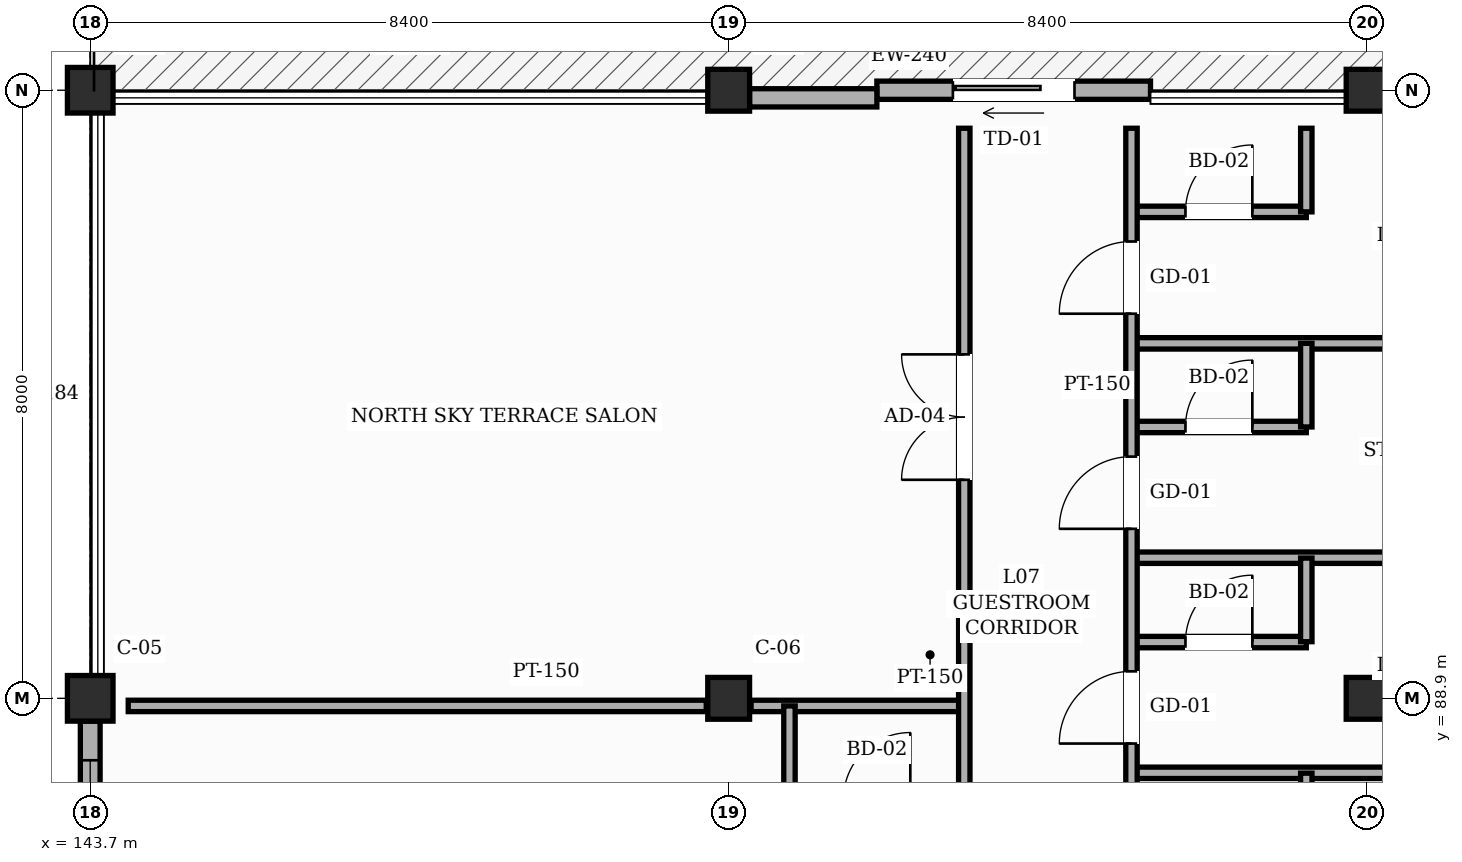
"""IFC4 building model, lengths in metres.
Left out: names, types, materials, properties, quantities, classifications, styles, units other than length and angle.
Written with IfcOpenShell. Run it as: python <this file> out.ifc"""

import sys

from ifc_helpers import new_model, si_unit, direction, frame, frame_2d, origin, origin_2d, place, context, subcontext, project, spatial, rectangle, hollow_rectangle, extrude, element, fill, save


model = new_model("IFC4")
c1 = context("Model", 3, precision=1e-05, world=origin(), true_north=direction((0.0, 1.0)))
c2 = subcontext(c1, "Body", "Model", "MODEL_VIEW")
j1 = project(units=[si_unit("LENGTHUNIT", "METRE"), si_unit("PLANEANGLEUNIT", "RADIAN")], contexts=[c1])
p1 = place(None, origin())
s1 = spatial("IfcSite", under=j1, at=p1, CompositionType="ELEMENT")
p2 = place(p1, origin())
s2 = spatial("IfcBuilding", under=s1, at=p2, CompositionType="ELEMENT")
p3 = place(p2, frame((0.0, 0.0, 31.8)))
s3 = spatial("IfcBuildingStorey", under=s2, at=p3, CompositionType="ELEMENT", Elevation=31.8)
for number, where, z_axis, x_axis in (
    (1, (143.7, 88.9, 0.0), (0.0, 0.0, 1.0), (1.0, 0.0, 0.0)),
    (2, (143.7, 96.9, 0.0), (0.0, 0.0, 1.0), (1.0, 0.0, 0.0)),
):
    element("IfcColumn", number, at=place(p3, frame(where, z_axis=z_axis, x_axis=x_axis)), inside=s3, PredefinedType="COLUMN", context=c2, shape_type="SweptSolid", body=[
        extrude(hollow_rectangle(XDim=0.6, YDim=0.6, WallThickness=0.025, InnerFilletRadius=0.025, OuterFilletRadius=0.05, at=origin_2d()), origin(), (0.0, 0.0, 1.0), 3.6),
    ])
for number, where, z_axis, x_axis in (
    (3, (152.1, 88.9, 0.0), (0.0, 0.0, 1.0), (1.0, 0.0, 0.0)),
    (4, (152.1, 96.9, 0.0), (0.0, 0.0, 1.0), (1.0, 0.0, 0.0)),
    (5, (160.5, 88.9, 0.0), (0.0, 0.0, 1.0), (1.0, 0.0, 0.0)),
    (6, (160.5, 96.9, 0.0), (0.0, 0.0, 1.0), (1.0, 0.0, 0.0)),
):
    element("IfcColumn", number, at=place(p3, frame(where, z_axis=z_axis, x_axis=x_axis)), inside=s3, PredefinedType="COLUMN", context=c2, shape_type="SweptSolid", body=[
        extrude(hollow_rectangle(XDim=0.55, YDim=0.55, WallThickness=0.022, InnerFilletRadius=0.022, OuterFilletRadius=0.044, at=origin_2d()), origin(), (0.0, 0.0, 1.0), 3.6),
    ])
p4 = place(p3, frame((143.7, 81.2, 0.0), z_axis=(0.0, 0.0, 1.0), x_axis=(0.0, 1.0, 0.0)))
e7 = element("IfcWall", 7, at=p4, inside=s3, PredefinedType="SOLIDWALL", context=c2, shape_type="SweptSolid", body=[
    extrude(rectangle(XDim=7.4, YDim=0.26, at=frame_2d((3.7, 0.0))), origin(), (0.0, 0.0, 1.0), 2.805),
])
p5 = place(p4, frame((0.15, 0.0, 0.85)))
e8 = element("IfcOpeningElement", 8, at=p5, cuts=e7, PredefinedType="OPENING", context=c2, shape_type="SweptSolid", body=[
    extrude(rectangle(XDim=1.35, YDim=1.35, at=frame_2d((0.675, 0.675))), frame((0.0, 0.14, 0.0), z_axis=(0.0, -1.0, 0.0), x_axis=(1.0, 0.0, 0.0)), (0.0, 0.0, 1.0), 0.28),
])
p6 = place(p4, frame((2.355, 0.0, 0.85)))
e9 = element("IfcOpeningElement", 9, at=p6, cuts=e7, PredefinedType="OPENING", context=c2, shape_type="SweptSolid", body=[
    extrude(rectangle(XDim=1.55, YDim=1.35, at=frame_2d((0.775, 0.675))), frame((0.0, 0.14, 0.0), z_axis=(0.0, -1.0, 0.0), x_axis=(1.0, 0.0, 0.0)), (0.0, 0.0, 1.0), 0.28),
])
p7 = place(p4, frame((5.135, 0.0, 0.85)))
e10 = element("IfcOpeningElement", 10, at=p7, cuts=e7, PredefinedType="OPENING", context=c2, shape_type="SweptSolid", body=[
    extrude(rectangle(XDim=1.75, YDim=1.35, at=frame_2d((0.875, 0.675))), frame((0.0, 0.14, 0.0), z_axis=(0.0, -1.0, 0.0), x_axis=(1.0, 0.0, 0.0)), (0.0, 0.0, 1.0), 0.28),
])
p8 = place(p3, frame((154.05, 96.9, 0.0), z_axis=(0.0, 0.0, 1.0), x_axis=(1.0, 0.0, 0.0)))
e11 = element("IfcWall", 11, at=p8, inside=s3, PredefinedType="SOLIDWALL", context=c2, shape_type="SweptSolid", body=[
    extrude(rectangle(XDim=3.6, YDim=0.24, at=frame_2d((1.8, 0.0))), origin(), (0.0, 0.0, 1.0), 2.755),
])
p9 = place(p8, frame((1.0, 0.0, 0.0)))
e12 = element("IfcOpeningElement", 12, at=p9, cuts=e11, PredefinedType="OPENING", context=c2, shape_type="SweptSolid", body=[
    extrude(rectangle(XDim=1.6, YDim=2.3, at=frame_2d((0.8, 1.15))), frame((0.0, 0.13, 0.0), z_axis=(0.0, -1.0, 0.0), x_axis=(1.0, 0.0, 0.0)), (0.0, 0.0, 1.0), 0.26),
])
p10 = place(p3, frame((152.375, 96.8, 0.0), z_axis=(0.0, 0.0, 1.0), x_axis=(1.0, 0.0, 0.0)))
e13 = element("IfcWall", 13, at=p10, inside=s3, PredefinedType="SOLIDWALL", context=c2, shape_type="SweptSolid", body=[
    extrude(rectangle(XDim=1.675, YDim=0.24, at=frame_2d((0.837, 0.0))), origin(), (0.0, 0.0, 1.0), 2.755),
])
p11 = place(p3, frame((157.4, 87.92, 0.0), z_axis=(0.0, 0.0, 1.0), x_axis=(1.0, 0.0, 0.0)))
e14 = element("IfcWall", 14, at=p11, inside=s3, PredefinedType="PARTITIONING", context=c2, shape_type="SweptSolid", body=[
    extrude(rectangle(XDim=9.8, YDim=0.15, at=frame_2d((4.9, 0.0))), origin(), (0.0, 0.0, 1.0), 3.365),
])
p12 = place(p3, frame((144.2, 88.8, 0.0), z_axis=(0.0, 0.0, 1.0), x_axis=(1.0, 0.0, 0.0)))
e15 = element("IfcWall", 15, at=p12, inside=s3, PredefinedType="PARTITIONING", context=c2, shape_type="SweptSolid", body=[
    extrude(rectangle(XDim=7.605, YDim=0.15, at=frame_2d((3.802, 0.0))), origin(), (0.0, 0.0, 1.0), 2.755),
])
p13 = place(p3, frame((152.395, 88.8, 0.0), z_axis=(0.0, 0.0, 1.0), x_axis=(1.0, 0.0, 0.0)))
e16 = element("IfcWall", 16, at=p13, inside=s3, PredefinedType="PARTITIONING", context=c2, shape_type="SweptSolid", body=[
    extrude(rectangle(XDim=2.805, YDim=0.15, at=frame_2d((1.402, 0.0))), origin(), (0.0, 0.0, 1.0), 2.755),
])
p14 = place(p3, frame((157.4, 89.64, 0.0), z_axis=(0.0, 0.0, 1.0), x_axis=(1.0, 0.0, 0.0)))
e17 = element("IfcWall", 17, at=p14, inside=s3, PredefinedType="PARTITIONING", context=c2, shape_type="SweptSolid", body=[
    extrude(rectangle(XDim=2.3, YDim=0.15, at=frame_2d((1.15, 0.0))), origin(), (0.0, 0.0, 1.0), 3.365),
])
p15 = place(p14, frame((0.71, 0.0, 0.0)))
e18 = element("IfcOpeningElement", 18, at=p15, cuts=e17, PredefinedType="OPENING", context=c2, shape_type="SweptSolid", body=[
    extrude(rectangle(XDim=0.88, YDim=2.12, at=frame_2d((0.44, 1.06))), frame((0.0, 0.085, 0.0), z_axis=(0.0, -1.0, 0.0), x_axis=(1.0, 0.0, 0.0)), (0.0, 0.0, 1.0), 0.17),
])
p16 = place(p3, frame((157.4, 90.75, 0.0), z_axis=(0.0, 0.0, 1.0), x_axis=(1.0, 0.0, 0.0)))
e19 = element("IfcWall", 19, at=p16, inside=s3, PredefinedType="PARTITIONING", context=c2, shape_type="SweptSolid", body=[
    extrude(rectangle(XDim=9.8, YDim=0.15, at=frame_2d((4.9, 0.0))), origin(), (0.0, 0.0, 1.0), 3.365),
])
p17 = place(p3, frame((157.4, 92.47, 0.0), z_axis=(0.0, 0.0, 1.0), x_axis=(1.0, 0.0, 0.0)))
e20 = element("IfcWall", 20, at=p17, inside=s3, PredefinedType="PARTITIONING", context=c2, shape_type="SweptSolid", body=[
    extrude(rectangle(XDim=2.3, YDim=0.15, at=frame_2d((1.15, 0.0))), origin(), (0.0, 0.0, 1.0), 3.365),
])
p18 = place(p17, frame((0.71, 0.0, 0.0)))
e21 = element("IfcOpeningElement", 21, at=p18, cuts=e20, PredefinedType="OPENING", context=c2, shape_type="SweptSolid", body=[
    extrude(rectangle(XDim=0.88, YDim=2.12, at=frame_2d((0.44, 1.06))), frame((0.0, 0.085, 0.0), z_axis=(0.0, -1.0, 0.0), x_axis=(1.0, 0.0, 0.0)), (0.0, 0.0, 1.0), 0.17),
])
p19 = place(p3, frame((157.4, 93.57, 0.0), z_axis=(0.0, 0.0, 1.0), x_axis=(1.0, 0.0, 0.0)))
e22 = element("IfcWall", 22, at=p19, inside=s3, PredefinedType="PARTITIONING", context=c2, shape_type="SweptSolid", body=[
    extrude(rectangle(XDim=9.8, YDim=0.15, at=frame_2d((4.9, 0.0))), origin(), (0.0, 0.0, 1.0), 3.365),
])
p20 = place(p3, frame((157.4, 95.3, 0.0), z_axis=(0.0, 0.0, 1.0), x_axis=(1.0, 0.0, 0.0)))
e23 = element("IfcWall", 23, at=p20, inside=s3, PredefinedType="PARTITIONING", context=c2, shape_type="SweptSolid", body=[
    extrude(rectangle(XDim=2.3, YDim=0.15, at=frame_2d((1.15, 0.0))), origin(), (0.0, 0.0, 1.0), 3.365),
])
p21 = place(p20, frame((0.71, 0.0, 0.0)))
e24 = element("IfcOpeningElement", 24, at=p21, cuts=e23, PredefinedType="OPENING", context=c2, shape_type="SweptSolid", body=[
    extrude(rectangle(XDim=0.88, YDim=2.12, at=frame_2d((0.44, 1.06))), frame((0.0, 0.085, 0.0), z_axis=(0.0, -1.0, 0.0), x_axis=(1.0, 0.0, 0.0)), (0.0, 0.0, 1.0), 0.17),
])
p22 = place(p3, frame((152.9, 87.57, 0.0), z_axis=(0.0, 0.0, 1.0), x_axis=(0.0, 1.0, 0.0)))
e25 = element("IfcWall", 25, at=p22, inside=s3, PredefinedType="PARTITIONING", context=c2, shape_type="SweptSolid", body=[
    extrude(rectangle(XDim=1.23, YDim=0.15, at=frame_2d((0.615, 0.0))), origin(), (0.0, 0.0, 1.0), 3.365),
])
p23 = place(p3, frame((155.2, 62.0, 0.0), z_axis=(0.0, 0.0, 1.0), x_axis=(0.0, 1.0, 0.0)))
e26 = element("IfcWall", 26, at=p23, inside=s3, PredefinedType="PARTITIONING", context=c2, shape_type="SweptSolid", body=[
    extrude(rectangle(XDim=34.4, YDim=0.15, at=frame_2d((17.2, 0.0))), origin(), (0.0, 0.0, 1.0), 3.365),
])
p24 = place(p23, frame((29.775, 0.0, 0.0)))
e27 = element("IfcOpeningElement", 27, at=p24, cuts=e26, PredefinedType="OPENING", context=c2, shape_type="SweptSolid", body=[
    extrude(rectangle(XDim=1.65, YDim=2.35, at=frame_2d((0.825, 1.175))), frame((0.0, 0.085, 0.0), z_axis=(0.0, -1.0, 0.0), x_axis=(1.0, 0.0, 0.0)), (0.0, 0.0, 1.0), 0.17),
])
p25 = place(p23, frame((0.4, 0.0, 0.0)))
e28 = element("IfcOpeningElement", 28, at=p25, cuts=e26, PredefinedType="OPENING", context=c2, shape_type="SweptSolid", body=[
    extrude(rectangle(XDim=0.95, YDim=2.15, at=frame_2d((0.475, 1.075))), frame((0.0, 0.085, 0.0), z_axis=(0.0, -1.0, 0.0), x_axis=(1.0, 0.0, 0.0)), (0.0, 0.0, 1.0), 0.17),
])
p26 = place(p23, frame((3.38, 0.0, 0.0)))
e29 = element("IfcOpeningElement", 29, at=p26, cuts=e26, PredefinedType="OPENING", context=c2, shape_type="SweptSolid", body=[
    extrude(rectangle(XDim=0.95, YDim=2.15, at=frame_2d((0.475, 1.075))), frame((0.0, 0.085, 0.0), z_axis=(0.0, -1.0, 0.0), x_axis=(1.0, 0.0, 0.0)), (0.0, 0.0, 1.0), 0.17),
])
p27 = place(p23, frame((6.355, 0.0, 0.0)))
e30 = element("IfcOpeningElement", 30, at=p27, cuts=e26, PredefinedType="OPENING", context=c2, shape_type="SweptSolid", body=[
    extrude(rectangle(XDim=0.95, YDim=2.15, at=frame_2d((0.475, 1.075))), frame((0.0, 0.085, 0.0), z_axis=(0.0, -1.0, 0.0), x_axis=(1.0, 0.0, 0.0)), (0.0, 0.0, 1.0), 0.17),
])
p28 = place(p23, frame((9.335, 0.0, 0.0)))
e31 = element("IfcOpeningElement", 31, at=p28, cuts=e26, PredefinedType="OPENING", context=c2, shape_type="SweptSolid", body=[
    extrude(rectangle(XDim=0.95, YDim=2.15, at=frame_2d((0.475, 1.075))), frame((0.0, 0.085, 0.0), z_axis=(0.0, -1.0, 0.0), x_axis=(1.0, 0.0, 0.0)), (0.0, 0.0, 1.0), 0.17),
])
p29 = place(p23, frame((12.31, 0.0, 0.0)))
e32 = element("IfcOpeningElement", 32, at=p29, cuts=e26, PredefinedType="OPENING", context=c2, shape_type="SweptSolid", body=[
    extrude(rectangle(XDim=0.95, YDim=2.15, at=frame_2d((0.475, 1.075))), frame((0.0, 0.085, 0.0), z_axis=(0.0, -1.0, 0.0), x_axis=(1.0, 0.0, 0.0)), (0.0, 0.0, 1.0), 0.17),
])
p30 = place(p23, frame((15.29, 0.0, 0.0)))
e33 = element("IfcOpeningElement", 33, at=p30, cuts=e26, PredefinedType="OPENING", context=c2, shape_type="SweptSolid", body=[
    extrude(rectangle(XDim=0.95, YDim=2.15, at=frame_2d((0.475, 1.075))), frame((0.0, 0.085, 0.0), z_axis=(0.0, -1.0, 0.0), x_axis=(1.0, 0.0, 0.0)), (0.0, 0.0, 1.0), 0.17),
])
p31 = place(p23, frame((18.265, 0.0, 0.0)))
e34 = element("IfcOpeningElement", 34, at=p31, cuts=e26, PredefinedType="OPENING", context=c2, shape_type="SweptSolid", body=[
    extrude(rectangle(XDim=0.95, YDim=2.15, at=frame_2d((0.475, 1.075))), frame((0.0, 0.085, 0.0), z_axis=(0.0, -1.0, 0.0), x_axis=(1.0, 0.0, 0.0)), (0.0, 0.0, 1.0), 0.17),
])
p32 = place(p23, frame((21.245, 0.0, 0.0)))
e35 = element("IfcOpeningElement", 35, at=p32, cuts=e26, PredefinedType="OPENING", context=c2, shape_type="SweptSolid", body=[
    extrude(rectangle(XDim=0.95, YDim=2.15, at=frame_2d((0.475, 1.075))), frame((0.0, 0.085, 0.0), z_axis=(0.0, -1.0, 0.0), x_axis=(1.0, 0.0, 0.0)), (0.0, 0.0, 1.0), 0.17),
])
p33 = place(p23, frame((24.22, 0.0, 0.0)))
e36 = element("IfcOpeningElement", 36, at=p33, cuts=e26, PredefinedType="OPENING", context=c2, shape_type="SweptSolid", body=[
    extrude(rectangle(XDim=0.95, YDim=2.15, at=frame_2d((0.475, 1.075))), frame((0.0, 0.085, 0.0), z_axis=(0.0, -1.0, 0.0), x_axis=(1.0, 0.0, 0.0)), (0.0, 0.0, 1.0), 0.17),
])
p34 = place(p3, frame((157.4, 76.6, 0.0), z_axis=(0.0, 0.0, 1.0), x_axis=(0.0, 1.0, 0.0)))
e37 = element("IfcWall", 37, at=p34, inside=s3, PredefinedType="PARTITIONING", context=c2, shape_type="SweptSolid", body=[
    extrude(rectangle(XDim=19.8, YDim=0.15, at=frame_2d((9.9, 0.0))), origin(), (0.0, 0.0, 1.0), 3.365),
])
p35 = place(p34, frame((0.39, 0.0, 0.0)))
e38 = element("IfcOpeningElement", 38, at=p35, cuts=e37, PredefinedType="OPENING", context=c2, shape_type="SweptSolid", body=[
    extrude(rectangle(XDim=0.95, YDim=2.15, at=frame_2d((0.475, 1.075))), frame((0.0, 0.085, 0.0), z_axis=(0.0, -1.0, 0.0), x_axis=(1.0, 0.0, 0.0)), (0.0, 0.0, 1.0), 0.17),
])
p36 = place(p34, frame((3.22, 0.0, 0.0)))
e39 = element("IfcOpeningElement", 39, at=p36, cuts=e37, PredefinedType="OPENING", context=c2, shape_type="SweptSolid", body=[
    extrude(rectangle(XDim=0.95, YDim=2.15, at=frame_2d((0.475, 1.075))), frame((0.0, 0.085, 0.0), z_axis=(0.0, -1.0, 0.0), x_axis=(1.0, 0.0, 0.0)), (0.0, 0.0, 1.0), 0.17),
])
p37 = place(p34, frame((6.045, 0.0, 0.0)))
e40 = element("IfcOpeningElement", 40, at=p37, cuts=e37, PredefinedType="OPENING", context=c2, shape_type="SweptSolid", body=[
    extrude(rectangle(XDim=0.95, YDim=2.15, at=frame_2d((0.475, 1.075))), frame((0.0, 0.085, 0.0), z_axis=(0.0, -1.0, 0.0), x_axis=(1.0, 0.0, 0.0)), (0.0, 0.0, 1.0), 0.17),
])
p38 = place(p34, frame((8.875, 0.0, 0.0)))
e41 = element("IfcOpeningElement", 41, at=p38, cuts=e37, PredefinedType="OPENING", context=c2, shape_type="SweptSolid", body=[
    extrude(rectangle(XDim=0.95, YDim=2.15, at=frame_2d((0.475, 1.075))), frame((0.0, 0.085, 0.0), z_axis=(0.0, -1.0, 0.0), x_axis=(1.0, 0.0, 0.0)), (0.0, 0.0, 1.0), 0.17),
])
p39 = place(p34, frame((11.705, 0.0, 0.0)))
e42 = element("IfcOpeningElement", 42, at=p39, cuts=e37, PredefinedType="OPENING", context=c2, shape_type="SweptSolid", body=[
    extrude(rectangle(XDim=0.95, YDim=2.15, at=frame_2d((0.475, 1.075))), frame((0.0, 0.085, 0.0), z_axis=(0.0, -1.0, 0.0), x_axis=(1.0, 0.0, 0.0)), (0.0, 0.0, 1.0), 0.17),
])
p40 = place(p34, frame((14.53, 0.0, 0.0)))
e43 = element("IfcOpeningElement", 43, at=p40, cuts=e37, PredefinedType="OPENING", context=c2, shape_type="SweptSolid", body=[
    extrude(rectangle(XDim=0.95, YDim=2.15, at=frame_2d((0.475, 1.075))), frame((0.0, 0.085, 0.0), z_axis=(0.0, -1.0, 0.0), x_axis=(1.0, 0.0, 0.0)), (0.0, 0.0, 1.0), 0.17),
])
p41 = place(p34, frame((17.36, 0.0, 0.0)))
e44 = element("IfcOpeningElement", 44, at=p41, cuts=e37, PredefinedType="OPENING", context=c2, shape_type="SweptSolid", body=[
    extrude(rectangle(XDim=0.95, YDim=2.15, at=frame_2d((0.475, 1.075))), frame((0.0, 0.085, 0.0), z_axis=(0.0, -1.0, 0.0), x_axis=(1.0, 0.0, 0.0)), (0.0, 0.0, 1.0), 0.17),
])
for number, where, z_axis, x_axis in (
    (45, (159.7, 86.815, 0.0), (0.0, 0.0, 1.0), (0.0, 1.0, 0.0)),
    (46, (159.7, 89.645, 0.0), (0.0, 0.0, 1.0), (0.0, 1.0, 0.0)),
    (47, (159.7, 92.47, 0.0), (0.0, 0.0, 1.0), (0.0, 1.0, 0.0)),
):
    element("IfcWall", number, at=place(p3, frame(where, z_axis=z_axis, x_axis=x_axis)), inside=s3, PredefinedType="PARTITIONING", context=c2, shape_type="SweptSolid", body=[
        extrude(rectangle(XDim=1.1, YDim=0.15, at=frame_2d((0.55, 0.0))), origin(), (0.0, 0.0, 1.0), 3.365),
    ])
p42 = place(p3, frame((159.7, 95.3, 0.0), z_axis=(0.0, 0.0, 1.0), x_axis=(0.0, 1.0, 0.0)))
e48 = element("IfcWall", 48, at=p42, inside=s3, PredefinedType="PARTITIONING", context=c2, shape_type="SweptSolid", body=[
    extrude(rectangle(XDim=1.1, YDim=0.15, at=frame_2d((0.55, 0.0))), origin(), (0.0, 0.0, 1.0), 3.365),
])
p43 = place(p7, origin())
e49 = element("IfcWindow", 49, at=p43, inside=s3, PartitioningType="SINGLE_PANEL", PredefinedType="WINDOW", context=c2, shape_type="SweptSolid", body=[
    extrude(rectangle(XDim=1.75, YDim=1.35, at=frame_2d((0.875, 0.675))), frame((0.0, 0.03, 0.0), z_axis=(0.0, -1.0, 0.0), x_axis=(1.0, 0.0, 0.0)), (0.0, 0.0, 1.0), 0.06),
])
fill(e10, e49)
p44 = place(p9, origin())
e50 = element("IfcDoor", 50, at=p44, inside=s3, OperationType="SLIDING_TO_LEFT", PredefinedType="DOOR", context=c2, shape_type="SweptSolid", body=[
    extrude(rectangle(XDim=1.6, YDim=2.3, at=frame_2d((0.8, 1.15))), frame((0.0, 0.025, 0.0), z_axis=(0.0, -1.0, 0.0), x_axis=(1.0, 0.0, 0.0)), (0.0, 0.0, 1.0), 0.05),
])
fill(e12, e50)
p45 = place(p24, origin())
e51 = element("IfcDoor", 51, at=p45, inside=s3, OperationType="DOUBLE_DOOR_SINGLE_SWING", PredefinedType="DOOR", context=c2, shape_type="SweptSolid", body=[
    extrude(rectangle(XDim=1.65, YDim=2.35, at=frame_2d((0.825, 1.175))), frame((0.0, 0.025, 0.0), z_axis=(0.0, -1.0, 0.0), x_axis=(1.0, 0.0, 0.0)), (0.0, 0.0, 1.0), 0.05),
])
fill(e27, e51)
p46 = place(p39, origin())
e52 = element("IfcDoor", 52, at=p46, inside=s3, OperationType="SINGLE_SWING_LEFT", PredefinedType="DOOR", context=c2, shape_type="SweptSolid", body=[
    extrude(rectangle(XDim=0.95, YDim=2.15, at=frame_2d((0.475, 1.075))), frame((0.0, 0.025, 0.0), z_axis=(0.0, -1.0, 0.0), x_axis=(1.0, 0.0, 0.0)), (0.0, 0.0, 1.0), 0.05),
])
fill(e42, e52)
p47 = place(p15, origin())
e53 = element("IfcDoor", 53, at=p47, inside=s3, OperationType="SINGLE_SWING_RIGHT", PredefinedType="DOOR", context=c2, shape_type="SweptSolid", body=[
    extrude(rectangle(XDim=0.88, YDim=2.12, at=frame_2d((0.44, 1.06))), frame((0.0, 0.025, 0.0), z_axis=(0.0, -1.0, 0.0), x_axis=(1.0, 0.0, 0.0)), (0.0, 0.0, 1.0), 0.05),
])
fill(e18, e53)
p48 = place(p40, origin())
e54 = element("IfcDoor", 54, at=p48, inside=s3, OperationType="SINGLE_SWING_LEFT", PredefinedType="DOOR", context=c2, shape_type="SweptSolid", body=[
    extrude(rectangle(XDim=0.95, YDim=2.15, at=frame_2d((0.475, 1.075))), frame((0.0, 0.025, 0.0), z_axis=(0.0, -1.0, 0.0), x_axis=(1.0, 0.0, 0.0)), (0.0, 0.0, 1.0), 0.05),
])
fill(e43, e54)
p49 = place(p18, origin())
e55 = element("IfcDoor", 55, at=p49, inside=s3, OperationType="SINGLE_SWING_RIGHT", PredefinedType="DOOR", context=c2, shape_type="SweptSolid", body=[
    extrude(rectangle(XDim=0.88, YDim=2.12, at=frame_2d((0.44, 1.06))), frame((0.0, 0.025, 0.0), z_axis=(0.0, -1.0, 0.0), x_axis=(1.0, 0.0, 0.0)), (0.0, 0.0, 1.0), 0.05),
])
fill(e21, e55)
p50 = place(p41, origin())
e56 = element("IfcDoor", 56, at=p50, inside=s3, OperationType="SINGLE_SWING_LEFT", PredefinedType="DOOR", context=c2, shape_type="SweptSolid", body=[
    extrude(rectangle(XDim=0.95, YDim=2.15, at=frame_2d((0.475, 1.075))), frame((0.0, 0.025, 0.0), z_axis=(0.0, -1.0, 0.0), x_axis=(1.0, 0.0, 0.0)), (0.0, 0.0, 1.0), 0.05),
])
fill(e44, e56)
p51 = place(p21, origin())
e57 = element("IfcDoor", 57, at=p51, inside=s3, OperationType="SINGLE_SWING_RIGHT", PredefinedType="DOOR", context=c2, shape_type="SweptSolid", body=[
    extrude(rectangle(XDim=0.88, YDim=2.12, at=frame_2d((0.44, 1.06))), frame((0.0, 0.025, 0.0), z_axis=(0.0, -1.0, 0.0), x_axis=(1.0, 0.0, 0.0)), (0.0, 0.0, 1.0), 0.05),
])
fill(e24, e57)
save(model, sys.argv[1])
